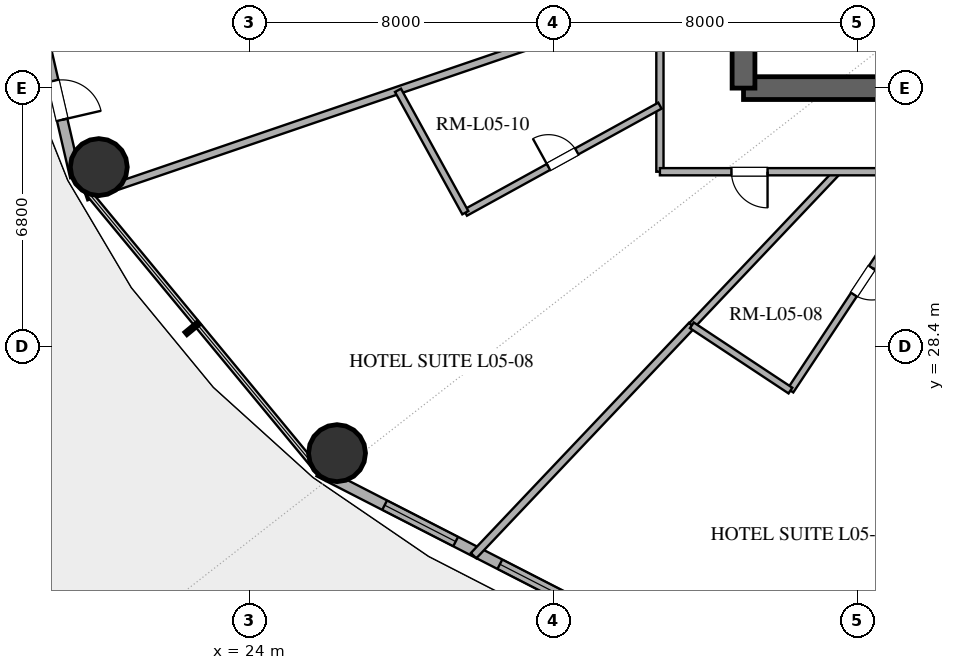
"""IFC4 building model, lengths in metres.
Left out: names, types, materials, properties, quantities, classifications, styles, units other than length and angle.
Written with IfcOpenShell. Run it as: python <this file> out.ifc"""

import sys

from ifc_helpers import new_model, si_unit, direction, frame, frame_2d, origin, origin_2d, place, context, subcontext, project, spatial, rectangle, hollow_circle, extrude, element, fill, save


model = new_model("IFC4")
c1 = context("Model", 3, precision=1e-05, world=origin(), true_north=direction((0.0, 1.0)))
c2 = subcontext(c1, "Body", "Model", "MODEL_VIEW")
j1 = project(units=[si_unit("LENGTHUNIT", "METRE"), si_unit("PLANEANGLEUNIT", "RADIAN")], contexts=[c1])
p1 = place(None, origin())
s1 = spatial("IfcSite", under=j1, at=p1, CompositionType="ELEMENT")
p2 = place(p1, origin())
s2 = spatial("IfcBuilding", under=s1, at=p2, CompositionType="ELEMENT")
p3 = place(p2, frame((0.0, 0.0, 28.2)))
s3 = spatial("IfcBuildingStorey", under=s2, at=p3, CompositionType="ELEMENT", Elevation=28.2)
p4 = place(p3, frame((37.0, 35.2, 0.0), z_axis=(0.0, 0.0, 1.0), x_axis=(1.0, 0.0, 0.0)))
e1 = element("IfcWall", 1, at=p4, inside=s3, PredefinedType="SHEAR", context=c2, shape_type="SweptSolid", body=[
    extrude(rectangle(XDim=4.0, YDim=0.6, at=frame_2d((2.0, 0.0))), origin(), (0.0, 0.0, 1.0), 3.38),
])
p5 = place(p3, frame((37.0, 35.2, 0.0), z_axis=(0.0, 0.0, 1.0), x_axis=(0.0, 1.0, 0.0)))
e2 = element("IfcWall", 2, at=p5, inside=s3, PredefinedType="SHEAR", context=c2, shape_type="SweptSolid", body=[
    extrude(rectangle(XDim=13.6, YDim=0.6, at=frame_2d((6.8, 0.0))), origin(), (0.0, 0.0, 1.0), 3.38),
])
p6 = place(p5, frame((1.5, 0.0, 0.0)))
e3 = element("IfcOpeningElement", 3, at=p6, cuts=e2, PredefinedType="OPENING", context=c2, shape_type="SweptSolid", body=[
    extrude(rectangle(XDim=1.2, YDim=2.15, at=frame_2d((0.6, 1.075))), frame((0.0, 0.31, 0.0), z_axis=(0.0, -1.0, 0.0), x_axis=(1.0, 0.0, 0.0)), (0.0, 0.0, 1.0), 0.62),
])
for number, where, z_axis, x_axis in (
    (4, (20.034, 33.122, 0.0), (0.0, 0.0, 1.0), (1.0, 0.0, 0.0)),
    (5, (26.303, 25.595, 0.0), (0.0, 0.0, 1.0), (1.0, 0.0, 0.0)),
):
    element("IfcColumn", number, at=place(p3, frame(where, z_axis=z_axis, x_axis=x_axis)), inside=s3, PredefinedType="COLUMN", context=c2, shape_type="SweptSolid", body=[
        extrude(hollow_circle(Radius=0.75, WallThickness=0.04, at=origin_2d()), origin(), (0.0, 0.0, 1.0), 3.38),
    ])
p7 = place(p3, frame((17.304, 42.0, 0.0), z_axis=(0.0, 0.0, 1.0), x_axis=(0.225454452941, -0.974253709076, 0.0)))
e6 = element("IfcWall", 6, at=p7, inside=s3, PredefinedType="SOLIDWALL", context=c2, shape_type="SweptSolid", body=[
    extrude(rectangle(XDim=9.38, YDim=0.28, at=frame_2d((4.69, 0.0))), origin(), (0.0, 0.0, 1.0), 3.38),
])
p8 = place(p7, frame((6.785, 0.0, 0.0)))
e7 = element("IfcOpeningElement", 7, at=p8, cuts=e6, PredefinedType="OPENING", context=c2, shape_type="SweptSolid", body=[
    extrude(rectangle(XDim=1.05, YDim=2.2, at=frame_2d((0.525, 1.1))), frame((0.0, 0.15, 0.0), z_axis=(0.0, -1.0, 0.0), x_axis=(1.0, 0.0, 0.0)), (0.0, 0.0, 1.0), 0.3),
])
p9 = place(p3, frame((25.826, 25.114, 0.0), z_axis=(0.0, 0.0, 1.0), x_axis=(0.889853976658, -0.456245438581, 0.0)))
e8 = element("IfcWall", 8, at=p9, inside=s3, PredefinedType="SOLIDWALL", context=c2, shape_type="SweptSolid", body=[
    extrude(rectangle(XDim=11.346, YDim=0.28, at=frame_2d((5.673, 0.0))), origin(), (0.0, 0.0, 1.0), 3.38),
])
p10 = place(p9, frame((1.945, 0.0, 0.85)))
e9 = element("IfcOpeningElement", 9, at=p10, cuts=e8, PredefinedType="OPENING", context=c2, shape_type="SweptSolid", body=[
    extrude(rectangle(XDim=2.1, YDim=2.2, at=frame_2d((1.05, 1.1))), frame((0.0, 0.15, 0.0), z_axis=(0.0, -1.0, 0.0), x_axis=(1.0, 0.0, 0.0)), (0.0, 0.0, 1.0), 0.3),
])
p11 = place(p9, frame((5.353, 0.0, 0.85)))
e10 = element("IfcOpeningElement", 10, at=p11, cuts=e8, PredefinedType="OPENING", context=c2, shape_type="SweptSolid", body=[
    extrude(rectangle(XDim=1.8, YDim=2.2, at=frame_2d((0.9, 1.1))), frame((0.0, 0.15, 0.0), z_axis=(0.0, -1.0, 0.0), x_axis=(1.0, 0.0, 0.0)), (0.0, 0.0, 1.0), 0.3),
])
p12 = place(p9, frame((7.622, 0.0, 0.85)))
e11 = element("IfcOpeningElement", 11, at=p12, cuts=e8, PredefinedType="OPENING", context=c2, shape_type="SweptSolid", body=[
    extrude(rectangle(XDim=1.8, YDim=2.2, at=frame_2d((0.9, 1.1))), frame((0.0, 0.15, 0.0), z_axis=(0.0, -1.0, 0.0), x_axis=(1.0, 0.0, 0.0)), (0.0, 0.0, 1.0), 0.3),
])
p13 = place(p3, frame((34.8, 37.494, 0.0), z_axis=(0.0, 0.0, 1.0), x_axis=(-0.946390715793, -0.32302416792, 0.0)))
e12 = element("IfcWall", 12, at=p13, inside=s3, PredefinedType="PARTITIONING", context=c2, shape_type="SweptSolid", body=[
    extrude(rectangle(XDim=15.952, YDim=0.2, at=frame_2d((7.976, 0.0))), origin(), (0.0, 0.0, 1.0), 2.74),
])
p14 = place(p3, frame((29.897, 22.898, 0.0), z_axis=(0.0, 0.0, 1.0), x_axis=(0.687860615602, 0.725842802198, 0.0)))
e13 = element("IfcWall", 13, at=p14, inside=s3, PredefinedType="PARTITIONING", context=c2, shape_type="SweptSolid", body=[
    extrude(rectangle(XDim=8.35, YDim=0.2, at=frame_2d((4.175, 0.0))), origin(), (0.0, 0.0, 1.0), 2.74),
])
p15 = place(p3, frame((42.045, 33.0, 0.0), z_axis=(0.0, 0.0, 1.0), x_axis=(-0.551832909025, -0.833954699319, 0.0)))
e14 = element("IfcWall", 14, at=p15, inside=s3, PredefinedType="PLUMBINGWALL", context=c2, shape_type="SweptSolid", body=[
    extrude(rectangle(XDim=6.905, YDim=0.18, at=frame_2d((3.452, 0.0))), origin(), (0.0, 0.0, 1.0), 2.74),
])
p16 = place(p15, frame((3.027, 0.0, 0.0)))
e15 = element("IfcOpeningElement", 15, at=p16, cuts=e14, PredefinedType="OPENING", context=c2, shape_type="SweptSolid", body=[
    extrude(rectangle(XDim=0.85, YDim=2.1, at=frame_2d((0.425, 1.05))), frame((0.0, 0.1, 0.0), z_axis=(0.0, -1.0, 0.0), x_axis=(1.0, 0.0, 0.0)), (0.0, 0.0, 1.0), 0.2),
])
p17 = place(p3, frame((34.8, 33.0, 0.0), z_axis=(0.0, 0.0, 1.0), x_axis=(0.0, 1.0, 0.0)))
e16 = element("IfcWall", 16, at=p17, inside=s3, PredefinedType="PARTITIONING", context=c2, shape_type="SweptSolid", body=[
    extrude(rectangle(XDim=18.0, YDim=0.19, at=frame_2d((9.0, 0.0))), origin(), (0.0, 0.0, 1.0), 2.74),
])
p18 = place(p17, frame((7.274, 0.0, 0.0)))
e17 = element("IfcOpeningElement", 17, at=p18, cuts=e16, PredefinedType="OPENING", context=c2, shape_type="SweptSolid", body=[
    extrude(rectangle(XDim=1.0, YDim=2.2, at=frame_2d((0.5, 1.1))), frame((0.0, 0.105, 0.0), z_axis=(0.0, -1.0, 0.0), x_axis=(1.0, 0.0, 0.0)), (0.0, 0.0, 1.0), 0.21),
])
p19 = place(p17, frame((12.854, 0.0, 0.0)))
e18 = element("IfcOpeningElement", 18, at=p19, cuts=e16, PredefinedType="OPENING", context=c2, shape_type="SweptSolid", body=[
    extrude(rectangle(XDim=0.95, YDim=2.15, at=frame_2d((0.475, 1.075))), frame((0.0, 0.105, 0.0), z_axis=(0.0, -1.0, 0.0), x_axis=(1.0, 0.0, 0.0)), (0.0, 0.0, 1.0), 0.21),
])
p20 = place(p3, frame((29.679, 31.922, 0.0), z_axis=(0.0, 0.0, 1.0), x_axis=(0.876185038284, 0.481974873503, 0.0)))
e19 = element("IfcWall", 19, at=p20, inside=s3, PredefinedType="PLUMBINGWALL", context=c2, shape_type="SweptSolid", body=[
    extrude(rectangle(XDim=5.844, YDim=0.18, at=frame_2d((2.922, 0.0))), origin(), (0.0, 0.0, 1.0), 2.74),
])
p21 = place(p20, frame((2.497, 0.0, 0.0)))
e20 = element("IfcOpeningElement", 20, at=p21, cuts=e19, PredefinedType="OPENING", context=c2, shape_type="SweptSolid", body=[
    extrude(rectangle(XDim=0.85, YDim=2.1, at=frame_2d((0.425, 1.05))), frame((0.0, 0.1, 0.0), z_axis=(0.0, -1.0, 0.0), x_axis=(1.0, 0.0, 0.0)), (0.0, 0.0, 1.0), 0.2),
])
p22 = place(p3, frame((35.64, 28.958, 0.0), z_axis=(0.0, 0.0, 1.0), x_axis=(0.687867465085, 0.725836311077, 0.0)))
e21 = element("IfcWall", 21, at=p22, inside=s3, PredefinedType="PLUMBINGWALL", context=c2, shape_type="SweptSolid", body=[
    extrude(rectangle(XDim=5.568, YDim=0.18, at=frame_2d((2.784, 0.0))), origin(), (0.0, 0.0, 1.0), 2.74),
])
p23 = place(p3, frame((42.083, 33.0, 0.0), z_axis=(0.0, 0.0, 1.0), x_axis=(-1.0, 0.0, 0.0)))
e22 = element("IfcWall", 22, at=p23, inside=s3, PredefinedType="PARTITIONING", context=c2, shape_type="SweptSolid", body=[
    extrude(rectangle(XDim=7.283, YDim=0.19, at=frame_2d((3.642, 0.0))), origin(), (0.0, 0.0, 1.0), 2.74),
])
p24 = place(p23, frame((4.451, 0.0, 0.0)))
e23 = element("IfcOpeningElement", 23, at=p24, cuts=e22, PredefinedType="OPENING", context=c2, shape_type="SweptSolid", body=[
    extrude(rectangle(XDim=0.95, YDim=2.15, at=frame_2d((0.475, 1.075))), frame((0.0, 0.105, 0.0), z_axis=(0.0, -1.0, 0.0), x_axis=(1.0, 0.0, 0.0)), (0.0, 0.0, 1.0), 0.21),
])
p25 = place(p3, frame((27.908, 35.142, 0.0), z_axis=(0.0, 0.0, 1.0), x_axis=(0.481967195945, -0.876189261537, 0.0)))
e24 = element("IfcWall", 24, at=p25, inside=s3, PredefinedType="PLUMBINGWALL", context=c2, shape_type="SweptSolid", body=[
    extrude(rectangle(XDim=3.676, YDim=0.18, at=frame_2d((1.838, 0.0))), origin(), (0.0, 0.0, 1.0), 2.74),
])
p26 = place(p3, frame((38.235, 27.242, 0.0), z_axis=(0.0, 0.0, 1.0), x_axis=(-0.833965136837, 0.551817135055, 0.0)))
e25 = element("IfcWall", 25, at=p26, inside=s3, PredefinedType="PLUMBINGWALL", context=c2, shape_type="SweptSolid", body=[
    extrude(rectangle(XDim=3.111, YDim=0.18, at=frame_2d((1.555, 0.0))), origin(), (0.0, 0.0, 1.0), 2.74),
])
p27 = place(p8, origin())
e26 = element("IfcDoor", 26, at=p27, inside=s3, OperationType="SINGLE_SWING_RIGHT", PredefinedType="DOOR", context=c2, shape_type="SweptSolid", body=[
    extrude(rectangle(XDim=1.05, YDim=2.2, at=frame_2d((0.525, 1.1))), frame((0.0, 0.025, 0.0), z_axis=(0.0, -1.0, 0.0), x_axis=(1.0, 0.0, 0.0)), (0.0, 0.0, 1.0), 0.05),
])
fill(e7, e26)
p28 = place(p10, origin())
e27 = element("IfcWindow", 27, at=p28, inside=s3, PartitioningType="SINGLE_PANEL", PredefinedType="WINDOW", context=c2, shape_type="SweptSolid", body=[
    extrude(rectangle(XDim=2.1, YDim=2.2, at=frame_2d((1.05, 1.1))), frame((0.0, 0.03, 0.0), z_axis=(0.0, -1.0, 0.0), x_axis=(1.0, 0.0, 0.0)), (0.0, 0.0, 1.0), 0.06),
])
fill(e9, e27)
p29 = place(p11, origin())
e28 = element("IfcWindow", 28, at=p29, inside=s3, PartitioningType="SINGLE_PANEL", PredefinedType="WINDOW", context=c2, shape_type="SweptSolid", body=[
    extrude(rectangle(XDim=1.8, YDim=2.2, at=frame_2d((0.9, 1.1))), frame((0.0, 0.03, 0.0), z_axis=(0.0, -1.0, 0.0), x_axis=(1.0, 0.0, 0.0)), (0.0, 0.0, 1.0), 0.06),
])
fill(e10, e28)
p30 = place(p16, origin())
e29 = element("IfcDoor", 29, at=p30, inside=s3, OperationType="SINGLE_SWING_LEFT", PredefinedType="DOOR", context=c2, shape_type="SweptSolid", body=[
    extrude(rectangle(XDim=0.85, YDim=2.1, at=frame_2d((0.425, 1.05))), frame((0.0, 0.025, 0.0), z_axis=(0.0, -1.0, 0.0), x_axis=(1.0, 0.0, 0.0)), (0.0, 0.0, 1.0), 0.05),
])
fill(e15, e29)
p31 = place(p21, origin())
e30 = element("IfcDoor", 30, at=p31, inside=s3, OperationType="SINGLE_SWING_LEFT", PredefinedType="DOOR", context=c2, shape_type="SweptSolid", body=[
    extrude(rectangle(XDim=0.85, YDim=2.1, at=frame_2d((0.425, 1.05))), frame((0.0, 0.025, 0.0), z_axis=(0.0, -1.0, 0.0), x_axis=(1.0, 0.0, 0.0)), (0.0, 0.0, 1.0), 0.05),
])
fill(e20, e30)
p32 = place(p24, origin())
e31 = element("IfcDoor", 31, at=p32, inside=s3, OperationType="SINGLE_SWING_LEFT", PredefinedType="DOOR", context=c2, shape_type="SweptSolid", body=[
    extrude(rectangle(XDim=0.95, YDim=2.15, at=frame_2d((0.475, 1.075))), frame((0.0, 0.025, 0.0), z_axis=(0.0, -1.0, 0.0), x_axis=(1.0, 0.0, 0.0)), (0.0, 0.0, 1.0), 0.05),
])
fill(e23, e31)
save(model, sys.argv[1])
